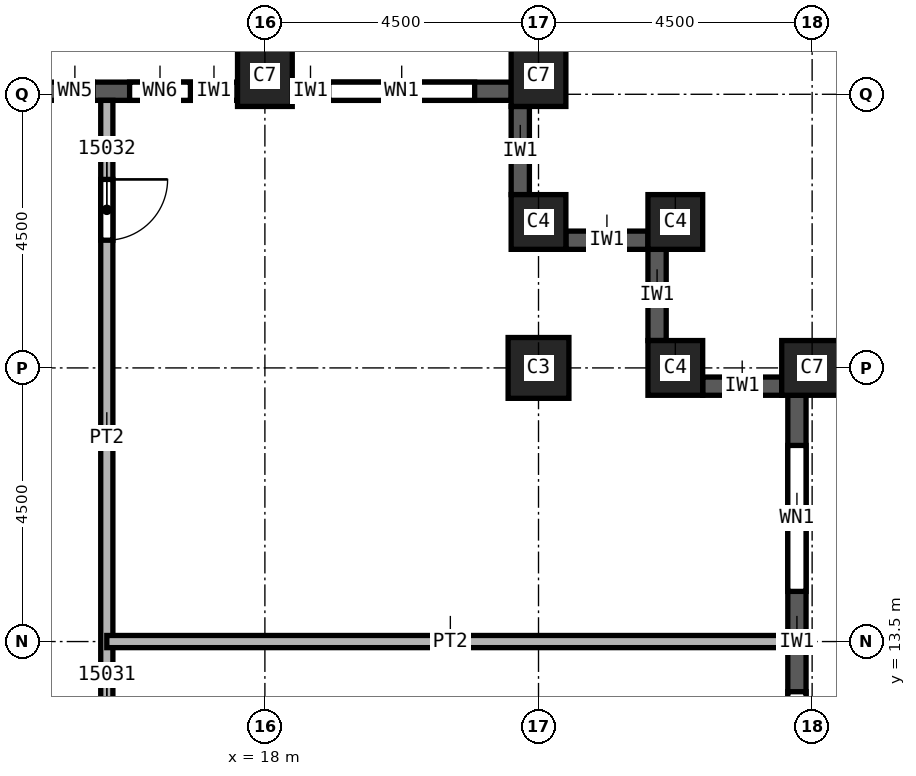
"""IFC4 building model, lengths in metres.
Left out: names, types, materials, properties, quantities, classifications, styles, units other than length and angle.
Written with IfcOpenShell. Run it as: python <this file> out.ifc"""

import sys

from ifc_helpers import new_model, si_unit, direction, frame, frame_2d, origin, origin_2d, place, context, subcontext, project, spatial, rectangle, extrude, element, fill, save


model = new_model("IFC4")
c1 = context("Model", 3, precision=1e-05, world=origin(), true_north=direction((0.0, 1.0)))
c2 = subcontext(c1, "Body", "Model", "MODEL_VIEW")
j1 = project(units=[si_unit("LENGTHUNIT", "METRE"), si_unit("PLANEANGLEUNIT", "RADIAN")], contexts=[c1])
p1 = place(None, origin())
s1 = spatial("IfcSite", under=j1, at=p1, CompositionType="ELEMENT")
p2 = place(p1, origin())
s2 = spatial("IfcBuilding", under=s1, at=p2, CompositionType="ELEMENT")
p3 = place(p2, frame((0.0, 0.0, 232.0)))
s3 = spatial("IfcBuildingStorey", under=s2, at=p3, CompositionType="ELEMENT", Elevation=232.0)
p4 = place(p3, frame((22.5, 18.0, 0.0), z_axis=(0.0, 0.0, 1.0), x_axis=(1.0, 0.0, 0.0)))
e1 = element("IfcColumn", 1, at=p4, inside=s3, PredefinedType="COLUMN", context=c2, shape_type="SweptSolid", body=[
    extrude(rectangle(XDim=1.0, YDim=1.0, at=origin_2d()), origin(), (0.0, 0.0, 1.0), 3.6),
])
for number, where, z_axis, x_axis in (
    (2, (27.0, 18.0, 0.0), (0.0, 0.0, 1.0), (0.0, 1.0, 0.0)),
    (3, (18.0, 22.8, 0.0), (0.0, 0.0, 1.0), (1.0, 0.0, 0.0)),
    (4, (22.5, 22.8, 0.0), (0.0, 0.0, 1.0), (1.0, 0.0, 0.0)),
):
    element("IfcColumn", number, at=place(p3, frame(where, z_axis=z_axis, x_axis=x_axis)), inside=s3, PredefinedType="COLUMN", context=c2, shape_type="SweptSolid", body=[
        extrude(rectangle(XDim=0.9, YDim=1.0, at=origin_2d()), origin(), (0.0, 0.0, 1.0), 3.6),
    ])
for number, where, z_axis, x_axis in (
    (5, (22.5, 20.4, 0.0), (0.0, 0.0, 1.0), (1.0, 0.0, 0.0)),
    (6, (24.75, 20.4, 0.0), (0.0, 0.0, 1.0), (1.0, 0.0, 0.0)),
    (7, (24.75, 18.0, 0.0), (0.0, 0.0, 1.0), (1.0, 0.0, 0.0)),
):
    element("IfcColumn", number, at=place(p3, frame(where, z_axis=z_axis, x_axis=x_axis)), inside=s3, PredefinedType="COLUMN", context=c2, shape_type="SweptSolid", body=[
        extrude(rectangle(XDim=0.9, YDim=0.9, at=origin_2d()), origin(), (0.0, 0.0, 1.0), 3.6),
    ])
p5 = place(p3, frame((26.75, 9.45, 0.0), z_axis=(0.0, 0.0, 1.0), x_axis=(0.0, 1.0, 0.0)))
e8 = element("IfcWall", 8, at=p5, inside=s3, PredefinedType="SOLIDWALL", context=c2, shape_type="SweptSolid", body=[
    extrude(rectangle(XDim=8.1, YDim=0.3, at=frame_2d((4.05, 0.0))), origin(), (0.0, 0.0, 1.0), 3.0),
])
p6 = place(p5, frame((0.825, 0.0, 0.8)))
e9 = element("IfcOpeningElement", 9, at=p6, cuts=e8, PredefinedType="OPENING", context=c2, shape_type="SweptSolid", body=[
    extrude(rectangle(XDim=2.4, YDim=1.95, at=frame_2d((1.2, 0.975))), frame((0.0, 0.15, 0.0), z_axis=(0.0, -1.0, 0.0), x_axis=(1.0, 0.0, 0.0)), (0.0, 0.0, 1.0), 0.3),
])
p7 = place(p5, frame((4.875, 0.0, 0.8)))
e10 = element("IfcOpeningElement", 10, at=p7, cuts=e8, PredefinedType="OPENING", context=c2, shape_type="SweptSolid", body=[
    extrude(rectangle(XDim=2.4, YDim=1.95, at=frame_2d((1.2, 0.975))), frame((0.0, 0.15, 0.0), z_axis=(0.0, -1.0, 0.0), x_axis=(1.0, 0.0, 0.0)), (0.0, 0.0, 1.0), 0.3),
])
p8 = place(p3, frame((26.5, 17.7, 0.0), z_axis=(0.0, 0.0, 1.0), x_axis=(-1.0, 0.0, 0.0)))
e11 = element("IfcWall", 11, at=p8, inside=s3, PredefinedType="SOLIDWALL", context=c2, shape_type="SweptSolid", body=[
    extrude(rectangle(XDim=1.3, YDim=0.3, at=frame_2d((0.65, 0.0))), origin(), (0.0, 0.0, 1.0), 3.0),
])
p9 = place(p3, frame((24.45, 18.45, 0.0), z_axis=(0.0, 0.0, 1.0), x_axis=(0.0, 1.0, 0.0)))
e12 = element("IfcWall", 12, at=p9, inside=s3, PredefinedType="SOLIDWALL", context=c2, shape_type="SweptSolid", body=[
    extrude(rectangle(XDim=1.5, YDim=0.3, at=frame_2d((0.75, 0.0))), origin(), (0.0, 0.0, 1.0), 3.0),
])
p10 = place(p3, frame((24.3, 20.1, 0.0), z_axis=(0.0, 0.0, 1.0), x_axis=(-1.0, 0.0, 0.0)))
e13 = element("IfcWall", 13, at=p10, inside=s3, PredefinedType="SOLIDWALL", context=c2, shape_type="SweptSolid", body=[
    extrude(rectangle(XDim=1.35, YDim=0.3, at=frame_2d((0.675, 0.0))), origin(), (0.0, 0.0, 1.0), 3.0),
])
p11 = place(p3, frame((22.2, 20.85, 0.0), z_axis=(0.0, 0.0, 1.0), x_axis=(0.0, 1.0, 0.0)))
e14 = element("IfcWall", 14, at=p11, inside=s3, PredefinedType="SOLIDWALL", context=c2, shape_type="SweptSolid", body=[
    extrude(rectangle(XDim=1.45, YDim=0.3, at=frame_2d((0.725, 0.0))), origin(), (0.0, 0.0, 1.0), 3.0),
])
p12 = place(p3, frame((22.05, 22.55, 0.0), z_axis=(0.0, 0.0, 1.0), x_axis=(-1.0, 0.0, 0.0)))
e15 = element("IfcWall", 15, at=p12, inside=s3, PredefinedType="SOLIDWALL", context=c2, shape_type="SweptSolid", body=[
    extrude(rectangle(XDim=3.6, YDim=0.3, at=frame_2d((1.8, 0.0))), origin(), (0.0, 0.0, 1.0), 3.0),
])
p13 = place(p12, frame((0.6, 0.0, 0.8)))
e16 = element("IfcOpeningElement", 16, at=p13, cuts=e15, PredefinedType="OPENING", context=c2, shape_type="SweptSolid", body=[
    extrude(rectangle(XDim=2.4, YDim=1.95, at=frame_2d((1.2, 0.975))), frame((0.0, 0.15, 0.0), z_axis=(0.0, -1.0, 0.0), x_axis=(1.0, 0.0, 0.0)), (0.0, 0.0, 1.0), 0.3),
])
p14 = place(p3, frame((17.55, 22.55, 0.0), z_axis=(0.0, 0.0, 1.0), x_axis=(-1.0, 0.0, 0.0)))
e17 = element("IfcWall", 17, at=p14, inside=s3, PredefinedType="SOLIDWALL", context=c2, shape_type="SweptSolid", body=[
    extrude(rectangle(XDim=3.6, YDim=0.3, at=frame_2d((1.8, 0.0))), origin(), (0.0, 0.0, 1.0), 3.0),
])
p15 = place(p14, frame((0.775, 0.0, 0.8)))
e18 = element("IfcOpeningElement", 18, at=p15, cuts=e17, PredefinedType="OPENING", context=c2, shape_type="SweptSolid", body=[
    extrude(rectangle(XDim=1.0, YDim=1.95, at=frame_2d((0.5, 0.975))), frame((0.0, 0.15, 0.0), z_axis=(0.0, -1.0, 0.0), x_axis=(1.0, 0.0, 0.0)), (0.0, 0.0, 1.0), 0.3),
])
p16 = place(p14, frame((2.375, 0.0, 0.8)))
e19 = element("IfcOpeningElement", 19, at=p16, cuts=e17, PredefinedType="OPENING", context=c2, shape_type="SweptSolid", body=[
    extrude(rectangle(XDim=0.6, YDim=1.95, at=frame_2d((0.3, 0.975))), frame((0.0, 0.15, 0.0), z_axis=(0.0, -1.0, 0.0), x_axis=(1.0, 0.0, 0.0)), (0.0, 0.0, 1.0), 0.3),
])
p17 = place(p3, frame((15.4, 22.4, 0.0), z_axis=(0.0, 0.0, 1.0), x_axis=(0.0, -1.0, 0.0)))
e20 = element("IfcWall", 20, at=p17, inside=s3, PredefinedType="PARTITIONING", context=c2, shape_type="SweptSolid", body=[
    extrude(rectangle(XDim=44.8, YDim=0.2, at=frame_2d((22.4, 0.0))), origin(), (0.0, 0.0, 1.0), 3.6),
])
p18 = place(p17, frame((18.5, 0.0, 0.0)))
e21 = element("IfcOpeningElement", 21, at=p18, cuts=e20, PredefinedType="OPENING", context=c2, shape_type="SweptSolid", body=[
    extrude(rectangle(XDim=1.0, YDim=2.1, at=frame_2d((0.5, 1.05))), frame((0.0, 0.1, 0.0), z_axis=(0.0, -1.0, 0.0), x_axis=(1.0, 0.0, 0.0)), (0.0, 0.0, 1.0), 0.2),
])
p19 = place(p17, frame((9.95, 0.0, 0.0)))
e22 = element("IfcOpeningElement", 22, at=p19, cuts=e20, PredefinedType="OPENING", context=c2, shape_type="SweptSolid", body=[
    extrude(rectangle(XDim=1.0, YDim=2.1, at=frame_2d((0.5, 1.05))), frame((0.0, 0.1, 0.0), z_axis=(0.0, -1.0, 0.0), x_axis=(1.0, 0.0, 0.0)), (0.0, 0.0, 1.0), 0.2),
])
p20 = place(p17, frame((1.3, 0.0, 0.0)))
e23 = element("IfcOpeningElement", 23, at=p20, cuts=e20, PredefinedType="OPENING", context=c2, shape_type="SweptSolid", body=[
    extrude(rectangle(XDim=1.0, YDim=2.1, at=frame_2d((0.5, 1.05))), frame((0.0, 0.1, 0.0), z_axis=(0.0, -1.0, 0.0), x_axis=(1.0, 0.0, 0.0)), (0.0, 0.0, 1.0), 0.2),
])
p21 = place(p17, frame((43.55, 0.0, 0.0)))
e24 = element("IfcOpeningElement", 24, at=p21, cuts=e20, PredefinedType="OPENING", context=c2, shape_type="SweptSolid", body=[
    extrude(rectangle(XDim=1.0, YDim=2.1, at=frame_2d((0.5, 1.05))), frame((0.0, 0.1, 0.0), z_axis=(0.0, -1.0, 0.0), x_axis=(1.0, 0.0, 0.0)), (0.0, 0.0, 1.0), 0.2),
])
p22 = place(p17, frame((38.3, 0.0, 0.0)))
e25 = element("IfcOpeningElement", 25, at=p22, cuts=e20, PredefinedType="OPENING", context=c2, shape_type="SweptSolid", body=[
    extrude(rectangle(XDim=1.0, YDim=2.1, at=frame_2d((0.5, 1.05))), frame((0.0, 0.1, 0.0), z_axis=(0.0, -1.0, 0.0), x_axis=(1.0, 0.0, 0.0)), (0.0, 0.0, 1.0), 0.2),
])
p23 = place(p17, frame((30.65, 0.0, 0.0)))
e26 = element("IfcOpeningElement", 26, at=p23, cuts=e20, PredefinedType="OPENING", context=c2, shape_type="SweptSolid", body=[
    extrude(rectangle(XDim=1.0, YDim=2.1, at=frame_2d((0.5, 1.05))), frame((0.0, 0.1, 0.0), z_axis=(0.0, -1.0, 0.0), x_axis=(1.0, 0.0, 0.0)), (0.0, 0.0, 1.0), 0.2),
])
p24 = place(p17, frame((24.2, 0.0, 0.0)))
e27 = element("IfcOpeningElement", 27, at=p24, cuts=e20, PredefinedType="OPENING", context=c2, shape_type="SweptSolid", body=[
    extrude(rectangle(XDim=1.0, YDim=2.1, at=frame_2d((0.5, 1.05))), frame((0.0, 0.1, 0.0), z_axis=(0.0, -1.0, 0.0), x_axis=(1.0, 0.0, 0.0)), (0.0, 0.0, 1.0), 0.2),
])
p25 = place(p3, frame((15.4, 13.5, 0.0), z_axis=(0.0, 0.0, 1.0), x_axis=(1.0, 0.0, 0.0)))
e28 = element("IfcWall", 28, at=p25, inside=s3, PredefinedType="PARTITIONING", context=c2, shape_type="SweptSolid", body=[
    extrude(rectangle(XDim=11.2, YDim=0.2, at=frame_2d((5.6, 0.0))), origin(), (0.0, 0.0, 1.0), 3.6),
])
p26 = place(p6, origin())
e29 = element("IfcWindow", 29, at=p26, inside=s3, PartitioningType="SINGLE_PANEL", PredefinedType="WINDOW", context=c2, shape_type="SweptSolid", body=[
    extrude(rectangle(XDim=2.4, YDim=1.95, at=frame_2d((1.2, 0.975))), frame((0.0, 0.03, 0.0), z_axis=(0.0, -1.0, 0.0), x_axis=(1.0, 0.0, 0.0)), (0.0, 0.0, 1.0), 0.06),
])
fill(e9, e29)
p27 = place(p7, origin())
e30 = element("IfcWindow", 30, at=p27, inside=s3, PartitioningType="SINGLE_PANEL", PredefinedType="WINDOW", context=c2, shape_type="SweptSolid", body=[
    extrude(rectangle(XDim=2.4, YDim=1.95, at=frame_2d((1.2, 0.975))), frame((0.0, 0.03, 0.0), z_axis=(0.0, -1.0, 0.0), x_axis=(1.0, 0.0, 0.0)), (0.0, 0.0, 1.0), 0.06),
])
fill(e10, e30)
p28 = place(p13, origin())
e31 = element("IfcWindow", 31, at=p28, inside=s3, PartitioningType="SINGLE_PANEL", PredefinedType="WINDOW", context=c2, shape_type="SweptSolid", body=[
    extrude(rectangle(XDim=2.4, YDim=1.95, at=frame_2d((1.2, 0.975))), frame((0.0, 0.03, 0.0), z_axis=(0.0, -1.0, 0.0), x_axis=(1.0, 0.0, 0.0)), (0.0, 0.0, 1.0), 0.06),
])
fill(e16, e31)
p29 = place(p20, origin())
e32 = element("IfcDoor", 32, at=p29, inside=s3, OperationType="SINGLE_SWING_LEFT", PredefinedType="DOOR", context=c2, shape_type="SweptSolid", body=[
    extrude(rectangle(XDim=1.0, YDim=2.1, at=frame_2d((0.5, 1.05))), frame((0.0, 0.025, 0.0), z_axis=(0.0, -1.0, 0.0), x_axis=(1.0, 0.0, 0.0)), (0.0, 0.0, 1.0), 0.05),
])
fill(e23, e32)
p30 = place(p15, origin())
e33 = element("IfcWindow", 33, at=p30, inside=s3, PartitioningType="SINGLE_PANEL", PredefinedType="WINDOW", context=c2, shape_type="SweptSolid", body=[
    extrude(rectangle(XDim=1.0, YDim=1.95, at=frame_2d((0.5, 0.975))), frame((0.0, 0.03, 0.0), z_axis=(0.0, -1.0, 0.0), x_axis=(1.0, 0.0, 0.0)), (0.0, 0.0, 1.0), 0.06),
])
fill(e18, e33)
p31 = place(p16, origin())
e34 = element("IfcWindow", 34, at=p31, inside=s3, PartitioningType="SINGLE_PANEL", PredefinedType="WINDOW", context=c2, shape_type="SweptSolid", body=[
    extrude(rectangle(XDim=0.6, YDim=1.95, at=frame_2d((0.3, 0.975))), frame((0.0, 0.03, 0.0), z_axis=(0.0, -1.0, 0.0), x_axis=(1.0, 0.0, 0.0)), (0.0, 0.0, 1.0), 0.06),
])
fill(e19, e34)
save(model, sys.argv[1])
